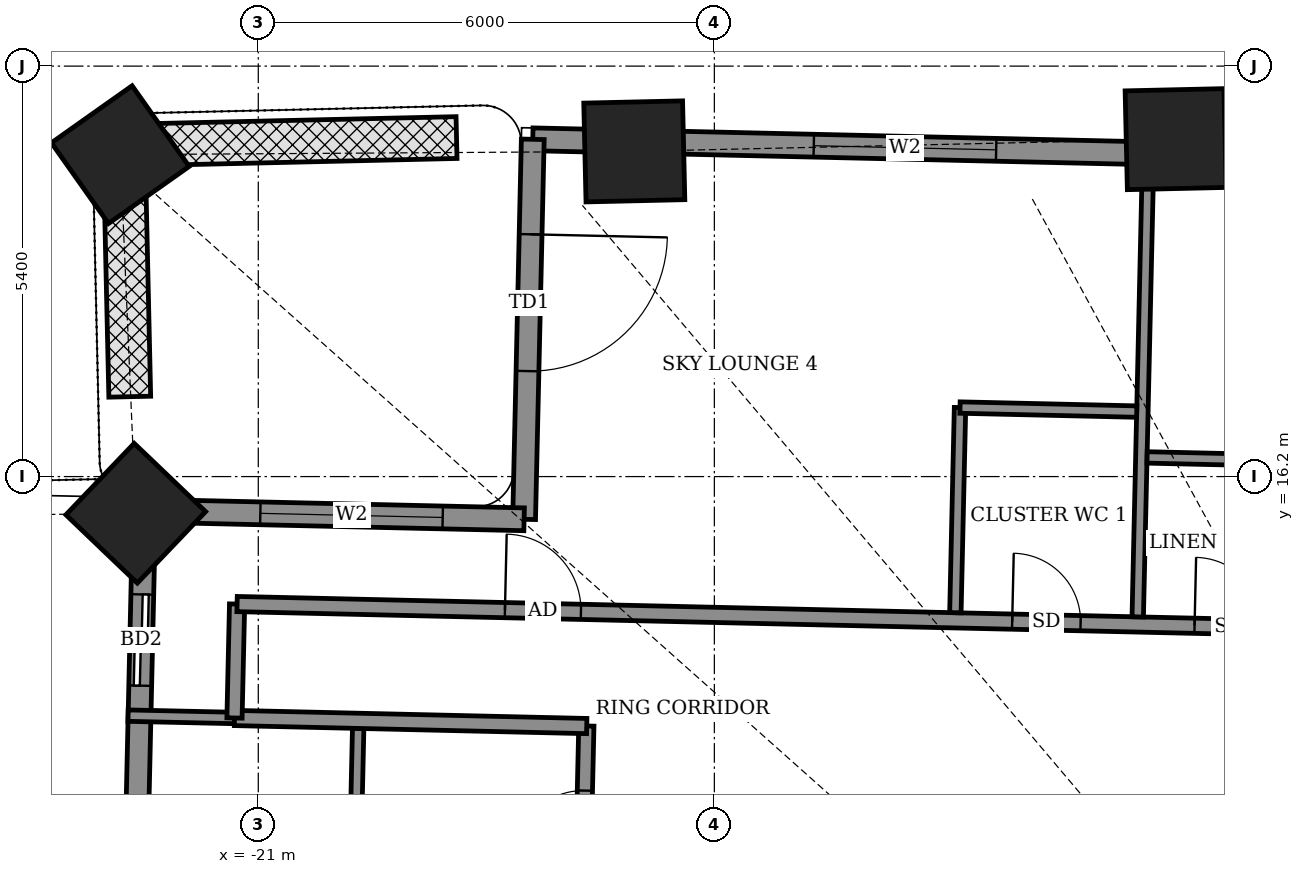
"""IFC4 building model, lengths in metres.
Left out: names, types, materials, properties, quantities, classifications, styles, units other than length and angle.
Written with IfcOpenShell. Run it as: python <this file> out.ifc"""

import sys

from ifc_helpers import new_model, si_unit, direction, frame, frame_2d, origin, origin_2d, place, context, subcontext, project, spatial, rectangle, extrude, element, fill, save


model = new_model("IFC4")
c1 = context("Model", 3, precision=1e-05, world=origin(), true_north=direction((0.0, 1.0)))
c2 = subcontext(c1, "Body", "Model", "MODEL_VIEW")
j1 = project(units=[si_unit("LENGTHUNIT", "METRE"), si_unit("PLANEANGLEUNIT", "RADIAN")], contexts=[c1])
p1 = place(None, origin())
s1 = spatial("IfcSite", under=j1, at=p1, CompositionType="ELEMENT")
p2 = place(p1, origin())
s2 = spatial("IfcBuilding", under=s1, at=p2, CompositionType="ELEMENT")
p3 = place(p2, frame((0.0, 0.0, 148.1)))
s3 = spatial("IfcBuildingStorey", under=s2, at=p3, CompositionType="ELEMENT", Elevation=148.1)
for number, where, z_axis, x_axis in (
    (1, (-8.931, 20.639, -0.55), (0.0, 0.0, 1.0), (-1.0, -0.023, 0.0)),
    (2, (-16.053, 20.478, -0.55), (0.0, 0.0, 1.0), (-1.0, -0.023, 0.0)),
    (3, (-22.816, 20.435, -0.55), (0.0, 0.0, 1.0), (-0.816, -0.577, 0.0)),
    (4, (-22.612, 15.718, -0.55), (0.0, 0.0, 1.0), (-0.691, -0.723, 0.0)),
):
    element("IfcColumn", number, at=place(p3, frame(where, z_axis=z_axis, x_axis=x_axis)), inside=s3, PredefinedType="COLUMN", context=c2, shape_type="SweptSolid", body=[
        extrude(rectangle(XDim=1.3, YDim=1.3, at=origin_2d()), origin(), (0.0, 0.0, 1.0), 4.6),
    ])
p4 = place(p3, frame((22.181, 19.739, 0.0), z_axis=(0.0, 0.0, 1.0), x_axis=(-0.999742618326, 0.022686936846, 0.0)))
e5 = element("IfcWall", 5, at=p4, inside=s3, PredefinedType="SOLIDWALL", context=c2, shape_type="SweptSolid", body=[
    extrude(rectangle(XDim=39.58, YDim=0.3, at=frame_2d((19.79, 0.0))), origin(), (0.0, 0.0, 1.0), 2.75),
])
p5 = place(p4, frame((4.7, 0.0, 0.0)))
e6 = element("IfcOpeningElement", 6, at=p5, cuts=e5, PredefinedType="OPENING", context=c2, shape_type="SweptSolid", body=[
    extrude(rectangle(XDim=1.5, YDim=2.4, at=frame_2d((0.75, 1.2))), frame((0.0, 0.16, 0.0), z_axis=(0.0, -1.0, 0.0), x_axis=(1.0, 0.0, 0.0)), (0.0, 0.0, 1.0), 0.32),
])
p6 = place(p4, frame((11.092, 0.0, 0.9)))
e7 = element("IfcOpeningElement", 7, at=p6, cuts=e5, PredefinedType="OPENING", context=c2, shape_type="SweptSolid", body=[
    extrude(rectangle(XDim=1.2, YDim=1.5, at=frame_2d((0.6, 0.75))), frame((0.0, 0.16, 0.0), z_axis=(0.0, -1.0, 0.0), x_axis=(1.0, 0.0, 0.0)), (0.0, 0.0, 1.0), 0.32),
])
p7 = place(p4, frame((13.571, 0.0, 0.9)))
e8 = element("IfcOpeningElement", 8, at=p7, cuts=e5, PredefinedType="OPENING", context=c2, shape_type="SweptSolid", body=[
    extrude(rectangle(XDim=2.4, YDim=1.5, at=frame_2d((1.2, 0.75))), frame((0.0, 0.16, 0.0), z_axis=(0.0, -1.0, 0.0), x_axis=(1.0, 0.0, 0.0)), (0.0, 0.0, 1.0), 0.32),
])
p8 = place(p4, frame((20.604, 0.0, 0.0)))
e9 = element("IfcOpeningElement", 9, at=p8, cuts=e5, PredefinedType="OPENING", context=c2, shape_type="SweptSolid", body=[
    extrude(rectangle(XDim=1.5, YDim=2.4, at=frame_2d((0.75, 1.2))), frame((0.0, 0.16, 0.0), z_axis=(0.0, -1.0, 0.0), x_axis=(1.0, 0.0, 0.0)), (0.0, 0.0, 1.0), 0.32),
])
p9 = place(p4, frame((26.366, 0.0, 0.9)))
e10 = element("IfcOpeningElement", 10, at=p9, cuts=e5, PredefinedType="OPENING", context=c2, shape_type="SweptSolid", body=[
    extrude(rectangle(XDim=2.4, YDim=1.5, at=frame_2d((1.2, 0.75))), frame((0.0, 0.16, 0.0), z_axis=(0.0, -1.0, 0.0), x_axis=(1.0, 0.0, 0.0)), (0.0, 0.0, 1.0), 0.32),
])
p10 = place(p4, frame((33.482, 0.0, 0.9)))
e11 = element("IfcOpeningElement", 11, at=p10, cuts=e5, PredefinedType="OPENING", context=c2, shape_type="SweptSolid", body=[
    extrude(rectangle(XDim=2.4, YDim=1.5, at=frame_2d((1.2, 0.75))), frame((0.0, 0.16, 0.0), z_axis=(0.0, -1.0, 0.0), x_axis=(1.0, 0.0, 0.0)), (0.0, 0.0, 1.0), 0.32),
])
p11 = place(p3, frame((-17.389, 20.637, 0.0), z_axis=(0.0, 0.0, 1.0), x_axis=(-0.022801259434, -0.999740017489, 0.0)))
e12 = element("IfcWall", 12, at=p11, inside=s3, PredefinedType="SOLIDWALL", context=c2, shape_type="SweptSolid", body=[
    extrude(rectangle(XDim=5.0, YDim=0.3, at=frame_2d((2.5, 0.0))), origin(), (0.0, 0.0, 1.0), 2.75),
])
p12 = place(p11, frame((1.25, 0.0, 0.0)))
e13 = element("IfcOpeningElement", 13, at=p12, cuts=e12, PredefinedType="OPENING", context=c2, shape_type="SweptSolid", body=[
    extrude(rectangle(XDim=1.8, YDim=2.4, at=frame_2d((0.9, 1.2))), frame((0.0, 0.16, 0.0), z_axis=(0.0, -1.0, 0.0), x_axis=(1.0, 0.0, 0.0)), (0.0, 0.0, 1.0), 0.32),
])
p13 = place(p3, frame((-17.503, 15.638, 0.0), z_axis=(0.0, 0.0, 1.0), x_axis=(-0.999744350543, 0.022610474516, 0.0)))
e14 = element("IfcWall", 14, at=p13, inside=s3, PredefinedType="SOLIDWALL", context=c2, shape_type="SweptSolid", body=[
    extrude(rectangle(XDim=4.999, YDim=0.3, at=frame_2d((2.5, 0.0))), origin(), (0.0, 0.0, 1.0), 2.75),
])
p14 = place(p13, frame((1.071, 0.0, 0.9)))
e15 = element("IfcOpeningElement", 15, at=p14, cuts=e14, PredefinedType="OPENING", context=c2, shape_type="SweptSolid", body=[
    extrude(rectangle(XDim=2.4, YDim=1.5, at=frame_2d((1.2, 0.75))), frame((0.0, 0.16, 0.0), z_axis=(0.0, -1.0, 0.0), x_axis=(1.0, 0.0, 0.0)), (0.0, 0.0, 1.0), 0.32),
])
p15 = place(p3, frame((-22.501, 15.751, 0.0), z_axis=(0.0, 0.0, 1.0), x_axis=(-0.022737995473, -0.999741458359, 0.0)))
e16 = element("IfcWall", 16, at=p15, inside=s3, PredefinedType="SOLIDWALL", context=c2, shape_type="SweptSolid", body=[
    extrude(rectangle(XDim=10.029, YDim=0.3, at=frame_2d((5.014, 0.0))), origin(), (0.0, 0.0, 1.0), 2.65),
])
p16 = place(p15, frame((1.102, 0.0, 0.0)))
e17 = element("IfcOpeningElement", 17, at=p16, cuts=e16, PredefinedType="OPENING", context=c2, shape_type="SweptSolid", body=[
    extrude(rectangle(XDim=1.2, YDim=2.4, at=frame_2d((0.6, 1.2))), frame((0.0, 0.16, 0.0), z_axis=(0.0, -1.0, 0.0), x_axis=(1.0, 0.0, 0.0)), (0.0, 0.0, 1.0), 0.32),
])
p17 = place(p15, frame((5.138, 0.0, 0.9)))
e18 = element("IfcOpeningElement", 18, at=p17, cuts=e16, PredefinedType="OPENING", context=c2, shape_type="SweptSolid", body=[
    extrude(rectangle(XDim=2.4, YDim=1.5, at=frame_2d((1.2, 0.75))), frame((0.0, 0.16, 0.0), z_axis=(0.0, -1.0, 0.0), x_axis=(1.0, 0.0, 0.0)), (0.0, 0.0, 1.0), 0.32),
])
p18 = place(p3, frame((-22.691, 17.251, 0.0), z_axis=(0.0, 0.0, 1.0), x_axis=(-0.022667408064, 0.999743061297, 0.0)))
e19 = element("IfcWall", 19, at=p18, inside=s3, PredefinedType="USERDEFINED", context=c2, shape_type="SweptSolid", body=[
    extrude(rectangle(XDim=2.876, YDim=0.55, at=frame_2d((1.438, 0.0))), origin(), (0.0, 0.0, 1.0), 0.8),
])
p19 = place(p3, frame((-22.331, 20.57, 0.0), z_axis=(0.0, 0.0, 1.0), x_axis=(0.999739976787, 0.022803043973, 0.0)))
e20 = element("IfcWall", 20, at=p19, inside=s3, PredefinedType="USERDEFINED", context=c2, shape_type="SweptSolid", body=[
    extrude(rectangle(XDim=3.94, YDim=0.55, at=frame_2d((1.97, 0.0))), origin(), (0.0, 0.0, 1.0), 0.8),
])
p20 = place(p3, frame((-17.32, -15.098, 0.0), z_axis=(0.0, 0.0, 1.0), x_axis=(0.022694293906, 0.999742451346, 0.0)))
e21 = element("IfcWall", 21, at=p20, inside=s3, PredefinedType="PARTITIONING", context=c2, shape_type="SweptSolid", body=[
    extrude(rectangle(XDim=28.024, YDim=0.2, at=frame_2d((14.012, 0.0))), origin(), (0.0, 0.0, 1.0), 2.55),
])
p21 = place(p20, frame((22.587, 0.0, 0.0)))
e22 = element("IfcOpeningElement", 22, at=p21, cuts=e21, PredefinedType="OPENING", context=c2, shape_type="SweptSolid", body=[
    extrude(rectangle(XDim=1.0, YDim=2.1, at=frame_2d((0.5, 1.05))), frame((0.0, 0.11, 0.0), z_axis=(0.0, -1.0, 0.0), x_axis=(1.0, 0.0, 0.0)), (0.0, 0.0, 1.0), 0.22),
])
p22 = place(p20, frame((26.274, 0.0, 0.0)))
e23 = element("IfcOpeningElement", 23, at=p22, cuts=e21, PredefinedType="OPENING", context=c2, shape_type="SweptSolid", body=[
    extrude(rectangle(XDim=0.9, YDim=2.1, at=frame_2d((0.45, 1.05))), frame((0.0, 0.11, 0.0), z_axis=(0.0, -1.0, 0.0), x_axis=(1.0, 0.0, 0.0)), (0.0, 0.0, 1.0), 0.22),
])
p23 = place(p20, frame((15.049, 0.0, 0.0)))
e24 = element("IfcOpeningElement", 24, at=p23, cuts=e21, PredefinedType="OPENING", context=c2, shape_type="SweptSolid", body=[
    extrude(rectangle(XDim=1.0, YDim=2.1, at=frame_2d((0.5, 1.05))), frame((0.0, 0.11, 0.0), z_axis=(0.0, -1.0, 0.0), x_axis=(1.0, 0.0, 0.0)), (0.0, 0.0, 1.0), 0.22),
])
p24 = place(p20, frame((19.099, 0.0, 0.0)))
e25 = element("IfcOpeningElement", 25, at=p24, cuts=e21, PredefinedType="OPENING", context=c2, shape_type="SweptSolid", body=[
    extrude(rectangle(XDim=0.9, YDim=2.1, at=frame_2d((0.45, 1.05))), frame((0.0, 0.11, 0.0), z_axis=(0.0, -1.0, 0.0), x_axis=(1.0, 0.0, 0.0)), (0.0, 0.0, 1.0), 0.22),
])
p25 = place(p20, frame((9.543, 0.0, 0.0)))
e26 = element("IfcOpeningElement", 26, at=p25, cuts=e21, PredefinedType="OPENING", context=c2, shape_type="SweptSolid", body=[
    extrude(rectangle(XDim=1.0, YDim=2.1, at=frame_2d((0.5, 1.05))), frame((0.0, 0.11, 0.0), z_axis=(0.0, -1.0, 0.0), x_axis=(1.0, 0.0, 0.0)), (0.0, 0.0, 1.0), 0.22),
])
p26 = place(p20, frame((2.999, 0.0, 0.0)))
e27 = element("IfcOpeningElement", 27, at=p26, cuts=e21, PredefinedType="OPENING", context=c2, shape_type="SweptSolid", body=[
    extrude(rectangle(XDim=1.0, YDim=2.1, at=frame_2d((0.5, 1.05))), frame((0.0, 0.11, 0.0), z_axis=(0.0, -1.0, 0.0), x_axis=(1.0, 0.0, 0.0)), (0.0, 0.0, 1.0), 0.22),
])
p27 = place(p3, frame((-19.742, 10.387, 0.0), z_axis=(0.0, 0.0, 1.0), x_axis=(0.022357691225, 0.99975003558, 0.0)))
e28 = element("IfcWall", 28, at=p27, inside=s3, PredefinedType="PARTITIONING", context=c2, shape_type="SweptSolid", body=[
    extrude(rectangle(XDim=2.501, YDim=0.15, at=frame_2d((1.25, 0.0))), origin(), (0.0, 0.0, 1.0), 2.65),
])
p28 = place(p3, frame((-22.713, 13.055, 0.0), z_axis=(0.0, 0.0, 1.0), x_axis=(0.999756172383, -0.022081571112, 0.0)))
e29 = element("IfcWall", 29, at=p28, inside=s3, PredefinedType="PARTITIONING", context=c2, shape_type="SweptSolid", body=[
    extrude(rectangle(XDim=1.404, YDim=0.15, at=frame_2d((0.702, 0.0))), origin(), (0.0, 0.0, 1.0), 4.05),
])
p29 = place(p3, frame((-21.313, 13.024, 0.0), z_axis=(0.0, 0.0, 1.0), x_axis=(0.999738699021, -0.022858995594, 0.0)))
e30 = element("IfcWall", 30, at=p29, inside=s3, PredefinedType="PARTITIONING", context=c2, shape_type="SweptSolid", body=[
    extrude(rectangle(XDim=4.635, YDim=0.2, at=frame_2d((2.318, 0.0))), origin(), (0.0, 0.0, 1.0), 4.05),
])
p30 = place(p3, frame((-21.313, 13.024, 0.0), z_axis=(0.0, 0.0, 1.0), x_axis=(0.022632637625, 0.99974384905, 0.0)))
e31 = element("IfcWall", 31, at=p30, inside=s3, PredefinedType="PARTITIONING", context=c2, shape_type="SweptSolid", body=[
    extrude(rectangle(XDim=1.5, YDim=0.2, at=frame_2d((0.75, 0.0))), origin(), (0.0, 0.0, 1.0), 4.05),
])
p31 = place(p3, frame((-21.279, 14.523, 0.0), z_axis=(0.0, 0.0, 1.0), x_axis=(0.999742775939, -0.022679990253, 0.0)))
e32 = element("IfcWall", 32, at=p31, inside=s3, PredefinedType="PARTITIONING", context=c2, shape_type="SweptSolid", body=[
    extrude(rectangle(XDim=43.252, YDim=0.2, at=frame_2d((21.626, 0.0))), origin(), (0.0, 0.0, 1.0), 2.75),
])
p32 = place(p31, frame((42.052, 0.0, 0.0)))
e33 = element("IfcOpeningElement", 33, at=p32, cuts=e32, PredefinedType="OPENING", context=c2, shape_type="SweptSolid", body=[
    extrude(rectangle(XDim=1.0, YDim=2.1, at=frame_2d((0.5, 1.05))), frame((0.0, 0.11, 0.0), z_axis=(0.0, -1.0, 0.0), x_axis=(1.0, 0.0, 0.0)), (0.0, 0.0, 1.0), 0.22),
])
p33 = place(p31, frame((36.8, 0.0, 0.0)))
e34 = element("IfcOpeningElement", 34, at=p33, cuts=e32, PredefinedType="OPENING", context=c2, shape_type="SweptSolid", body=[
    extrude(rectangle(XDim=0.9, YDim=2.1, at=frame_2d((0.45, 1.05))), frame((0.0, 0.11, 0.0), z_axis=(0.0, -1.0, 0.0), x_axis=(1.0, 0.0, 0.0)), (0.0, 0.0, 1.0), 0.22),
])
p34 = place(p31, frame((32.625, 0.0, 0.0)))
e35 = element("IfcOpeningElement", 35, at=p34, cuts=e32, PredefinedType="OPENING", context=c2, shape_type="SweptSolid", body=[
    extrude(rectangle(XDim=1.0, YDim=2.1, at=frame_2d((0.5, 1.05))), frame((0.0, 0.11, 0.0), z_axis=(0.0, -1.0, 0.0), x_axis=(1.0, 0.0, 0.0)), (0.0, 0.0, 1.0), 0.22),
])
p35 = place(p31, frame((27.9, 0.0, 0.0)))
e36 = element("IfcOpeningElement", 36, at=p35, cuts=e32, PredefinedType="OPENING", context=c2, shape_type="SweptSolid", body=[
    extrude(rectangle(XDim=1.0, YDim=2.1, at=frame_2d((0.5, 1.05))), frame((0.0, 0.11, 0.0), z_axis=(0.0, -1.0, 0.0), x_axis=(1.0, 0.0, 0.0)), (0.0, 0.0, 1.0), 0.22),
])
p36 = place(p31, frame((24.95, 0.0, 0.0)))
e37 = element("IfcOpeningElement", 37, at=p36, cuts=e32, PredefinedType="OPENING", context=c2, shape_type="SweptSolid", body=[
    extrude(rectangle(XDim=0.9, YDim=2.1, at=frame_2d((0.45, 1.05))), frame((0.0, 0.11, 0.0), z_axis=(0.0, -1.0, 0.0), x_axis=(1.0, 0.0, 0.0)), (0.0, 0.0, 1.0), 0.22),
])
p37 = place(p31, frame((20.075, 0.0, 0.0)))
e38 = element("IfcOpeningElement", 38, at=p37, cuts=e32, PredefinedType="OPENING", context=c2, shape_type="SweptSolid", body=[
    extrude(rectangle(XDim=0.9, YDim=2.1, at=frame_2d((0.45, 1.05))), frame((0.0, 0.11, 0.0), z_axis=(0.0, -1.0, 0.0), x_axis=(1.0, 0.0, 0.0)), (0.0, 0.0, 1.0), 0.22),
])
p38 = place(p31, frame((16.25, 0.0, 0.0)))
e39 = element("IfcOpeningElement", 39, at=p38, cuts=e32, PredefinedType="OPENING", context=c2, shape_type="SweptSolid", body=[
    extrude(rectangle(XDim=1.0, YDim=2.1, at=frame_2d((0.5, 1.05))), frame((0.0, 0.11, 0.0), z_axis=(0.0, -1.0, 0.0), x_axis=(1.0, 0.0, 0.0)), (0.0, 0.0, 1.0), 0.22),
])
p39 = place(p31, frame((12.6, 0.0, 0.0)))
e40 = element("IfcOpeningElement", 40, at=p39, cuts=e32, PredefinedType="OPENING", context=c2, shape_type="SweptSolid", body=[
    extrude(rectangle(XDim=0.9, YDim=2.1, at=frame_2d((0.45, 1.05))), frame((0.0, 0.11, 0.0), z_axis=(0.0, -1.0, 0.0), x_axis=(1.0, 0.0, 0.0)), (0.0, 0.0, 1.0), 0.22),
])
p40 = place(p31, frame((3.525, 0.0, 0.0)))
e41 = element("IfcOpeningElement", 41, at=p40, cuts=e32, PredefinedType="OPENING", context=c2, shape_type="SweptSolid", body=[
    extrude(rectangle(XDim=1.0, YDim=2.1, at=frame_2d((0.5, 1.05))), frame((0.0, 0.11, 0.0), z_axis=(0.0, -1.0, 0.0), x_axis=(1.0, 0.0, 0.0)), (0.0, 0.0, 1.0), 0.22),
])
p41 = place(p31, frame((10.2, 0.0, 0.0)))
e42 = element("IfcOpeningElement", 42, at=p41, cuts=e32, PredefinedType="OPENING", context=c2, shape_type="SweptSolid", body=[
    extrude(rectangle(XDim=0.9, YDim=2.1, at=frame_2d((0.45, 1.05))), frame((0.0, 0.11, 0.0), z_axis=(0.0, -1.0, 0.0), x_axis=(1.0, 0.0, 0.0)), (0.0, 0.0, 1.0), 0.22),
])
p42 = place(p3, frame((-11.829, 14.409, 0.0), z_axis=(0.0, 0.0, 1.0), x_axis=(0.02260842146, 0.999744396973, 0.0)))
e43 = element("IfcWall", 43, at=p42, inside=s3, PredefinedType="PARTITIONING", context=c2, shape_type="SweptSolid", body=[
    extrude(rectangle(XDim=2.7, YDim=0.15, at=frame_2d((1.35, 0.0))), origin(), (0.0, 0.0, 1.0), 2.85),
])
p43 = place(p3, frame((-9.43, 14.354, 0.0), z_axis=(0.0, 0.0, 1.0), x_axis=(0.022688785847, 0.999742576365, 0.0)))
e44 = element("IfcWall", 44, at=p43, inside=s3, PredefinedType="PARTITIONING", context=c2, shape_type="SweptSolid", body=[
    extrude(rectangle(XDim=5.95, YDim=0.15, at=frame_2d((2.975, 0.0))), origin(), (0.0, 0.0, 1.0), 2.85),
])
p44 = place(p3, frame((-9.307, 16.452, 0.0), z_axis=(0.0, 0.0, 1.0), x_axis=(0.999740260747, -0.02279059109, 0.0)))
e45 = element("IfcWall", 45, at=p44, inside=s3, PredefinedType="PARTITIONING", context=c2, shape_type="SweptSolid", body=[
    extrude(rectangle(XDim=2.324, YDim=0.15, at=frame_2d((1.162, 0.0))), origin(), (0.0, 0.0, 1.0), 2.85),
])
p45 = place(p3, frame((-11.768, 17.108, 0.0), z_axis=(0.0, 0.0, 1.0), x_axis=(0.999740478815, -0.022781023197, 0.0)))
e46 = element("IfcWall", 46, at=p45, inside=s3, PredefinedType="PARTITIONING", context=c2, shape_type="SweptSolid", body=[
    extrude(rectangle(XDim=2.325, YDim=0.15, at=frame_2d((1.163, 0.0))), origin(), (0.0, 0.0, 1.0), 2.85),
])
p46 = place(p10, origin())
e47 = element("IfcWindow", 47, at=p46, inside=s3, PartitioningType="DOUBLE_PANEL_VERTICAL", PredefinedType="WINDOW", context=c2, shape_type="SweptSolid", body=[
    extrude(rectangle(XDim=2.4, YDim=1.5, at=frame_2d((1.2, 0.75))), frame((0.0, 0.03, 0.0), z_axis=(0.0, -1.0, 0.0), x_axis=(1.0, 0.0, 0.0)), (0.0, 0.0, 1.0), 0.06),
])
fill(e11, e47)
p47 = place(p12, origin())
e48 = element("IfcDoor", 48, at=p47, inside=s3, OperationType="DOUBLE_DOOR_SINGLE_SWING", PredefinedType="DOOR", context=c2, shape_type="SweptSolid", body=[
    extrude(rectangle(XDim=1.8, YDim=2.4, at=frame_2d((0.9, 1.2))), frame((0.0, 0.025, 0.0), z_axis=(0.0, -1.0, 0.0), x_axis=(1.0, 0.0, 0.0)), (0.0, 0.0, 1.0), 0.05),
])
fill(e13, e48)
p48 = place(p14, origin())
e49 = element("IfcWindow", 49, at=p48, inside=s3, PartitioningType="DOUBLE_PANEL_VERTICAL", PredefinedType="WINDOW", context=c2, shape_type="SweptSolid", body=[
    extrude(rectangle(XDim=2.4, YDim=1.5, at=frame_2d((1.2, 0.75))), frame((0.0, 0.03, 0.0), z_axis=(0.0, -1.0, 0.0), x_axis=(1.0, 0.0, 0.0)), (0.0, 0.0, 1.0), 0.06),
])
fill(e15, e49)
p49 = place(p16, origin())
e50 = element("IfcDoor", 50, at=p49, inside=s3, OperationType="SLIDING_TO_LEFT", PredefinedType="DOOR", context=c2, shape_type="SweptSolid", body=[
    extrude(rectangle(XDim=1.2, YDim=2.4, at=frame_2d((0.6, 1.2))), frame((0.0, 0.025, 0.0), z_axis=(0.0, -1.0, 0.0), x_axis=(1.0, 0.0, 0.0)), (0.0, 0.0, 1.0), 0.05),
])
fill(e17, e50)
p50 = place(p39, origin())
e51 = element("IfcDoor", 51, at=p50, inside=s3, OperationType="SINGLE_SWING_LEFT", PredefinedType="DOOR", context=c2, shape_type="SweptSolid", body=[
    extrude(rectangle(XDim=0.9, YDim=2.1, at=frame_2d((0.45, 1.05))), frame((0.0, 0.025, 0.0), z_axis=(0.0, -1.0, 0.0), x_axis=(1.0, 0.0, 0.0)), (0.0, 0.0, 1.0), 0.05),
])
fill(e40, e51)
p51 = place(p40, origin())
e52 = element("IfcDoor", 52, at=p51, inside=s3, OperationType="SINGLE_SWING_RIGHT", PredefinedType="DOOR", context=c2, shape_type="SweptSolid", body=[
    extrude(rectangle(XDim=1.0, YDim=2.1, at=frame_2d((0.5, 1.05))), frame((0.0, 0.025, 0.0), z_axis=(0.0, -1.0, 0.0), x_axis=(1.0, 0.0, 0.0)), (0.0, 0.0, 1.0), 0.05),
])
fill(e41, e52)
p52 = place(p41, origin())
e53 = element("IfcDoor", 53, at=p52, inside=s3, OperationType="SINGLE_SWING_RIGHT", PredefinedType="DOOR", context=c2, shape_type="SweptSolid", body=[
    extrude(rectangle(XDim=0.9, YDim=2.1, at=frame_2d((0.45, 1.05))), frame((0.0, 0.025, 0.0), z_axis=(0.0, -1.0, 0.0), x_axis=(1.0, 0.0, 0.0)), (0.0, 0.0, 1.0), 0.05),
])
fill(e42, e53)
p53 = place(p22, origin())
e54 = element("IfcDoor", 54, at=p53, inside=s3, OperationType="SINGLE_SWING_LEFT", PredefinedType="DOOR", context=c2, shape_type="SweptSolid", body=[
    extrude(rectangle(XDim=0.9, YDim=2.1, at=frame_2d((0.45, 1.05))), frame((0.0, 0.025, 0.0), z_axis=(0.0, -1.0, 0.0), x_axis=(1.0, 0.0, 0.0)), (0.0, 0.0, 1.0), 0.05),
])
fill(e23, e54)
save(model, sys.argv[1])
